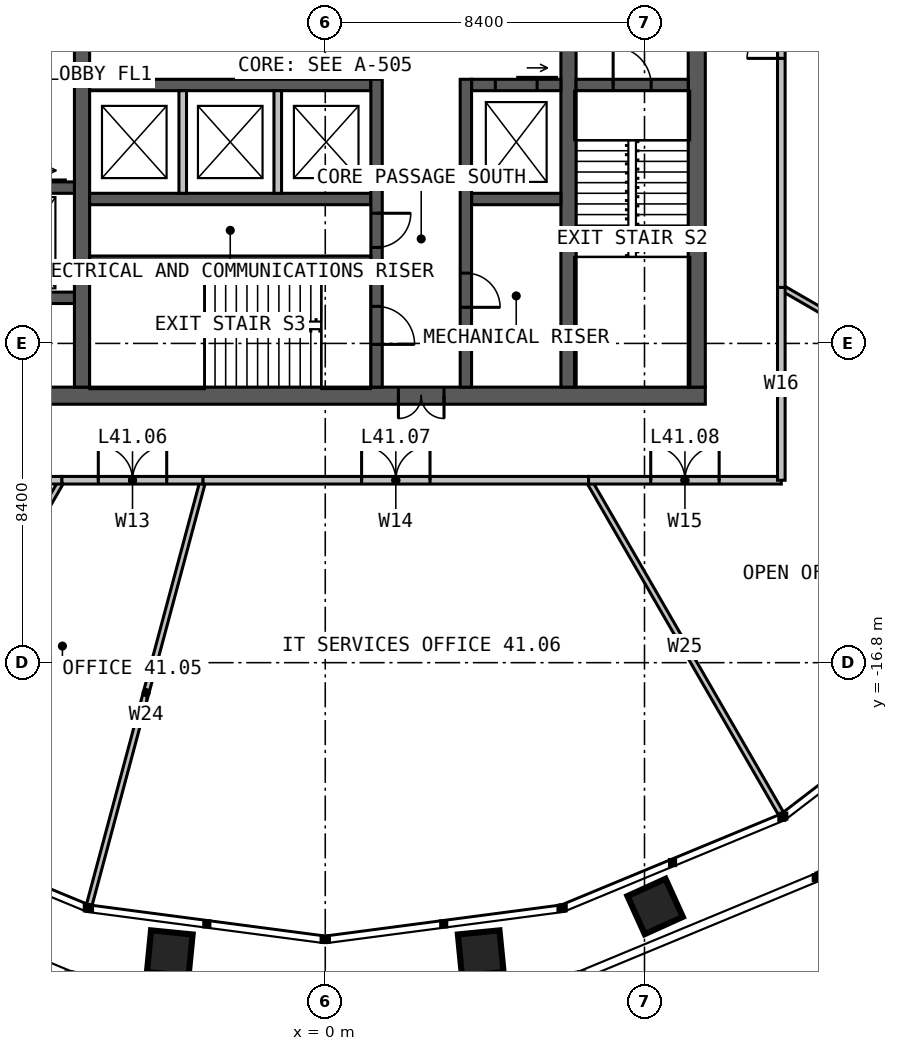
"""IFC4 building model, lengths in metres.
Left out: names, types, materials, properties, quantities, classifications, styles, units other than length and angle.
Written with IfcOpenShell. Run it as: python <this file> out.ifc"""

import sys

from ifc_helpers import new_model, si_unit, direction, frame, frame_2d, origin, place, context, subcontext, project, spatial, rectangle, extrude, element, fill, save


model = new_model("IFC4")
c1 = context("Model", 3, precision=1e-05, world=origin(), true_north=direction((0.0, 1.0)))
c2 = subcontext(c1, "Body", "Model", "MODEL_VIEW")
j1 = project(units=[si_unit("LENGTHUNIT", "METRE"), si_unit("PLANEANGLEUNIT", "RADIAN")], contexts=[c1])
p1 = place(None, origin())
s1 = spatial("IfcSite", under=j1, at=p1, CompositionType="ELEMENT")
p2 = place(p1, origin())
s2 = spatial("IfcBuilding", under=s1, at=p2, CompositionType="ELEMENT")
p3 = place(p2, frame((0.0, 0.0, 171.0)))
s3 = spatial("IfcBuildingStorey", under=s2, at=p3, CompositionType="ELEMENT", Elevation=171.0)
p4 = place(p3, frame((10.0, -9.775, 0.0), z_axis=(0.0, 0.0, 1.0), x_axis=(-1.0, 0.0, 0.0)))
e1 = element("IfcWall", 1, at=p4, inside=s3, PredefinedType="SOLIDWALL", context=c2, shape_type="SweptSolid", body=[
    extrude(rectangle(XDim=20.0, YDim=0.45, at=frame_2d((10.0, 0.0))), origin(), (0.0, 0.0, 1.0), 4.0),
])
p5 = place(p4, frame((6.875, 0.0, 0.0)))
e2 = element("IfcOpeningElement", 2, at=p5, cuts=e1, PredefinedType="OPENING", context=c2, shape_type="SweptSolid", body=[
    extrude(rectangle(XDim=1.2, YDim=2.2, at=frame_2d((0.6, 1.1))), frame((0.0, 0.235, 0.0), z_axis=(0.0, -1.0, 0.0), x_axis=(1.0, 0.0, 0.0)), (0.0, 0.0, 1.0), 0.47),
])
p6 = place(p3, frame((9.775, -9.55, 0.0), z_axis=(0.0, 0.0, 1.0), x_axis=(0.0, 1.0, 0.0)))
e3 = element("IfcWall", 3, at=p6, inside=s3, PredefinedType="SOLIDWALL", context=c2, shape_type="SweptSolid", body=[
    extrude(rectangle(XDim=19.1, YDim=0.45, at=frame_2d((9.55, 0.0))), origin(), (0.0, 0.0, 1.0), 4.0),
])
p7 = place(p3, frame((-6.4, -9.55, 0.0), z_axis=(0.0, 0.0, 1.0), x_axis=(0.0, 1.0, 0.0)))
e4 = element("IfcWall", 4, at=p7, inside=s3, PredefinedType="SOLIDWALL", context=c2, shape_type="SweptSolid", body=[
    extrude(rectangle(XDim=19.1, YDim=0.4, at=frame_2d((9.55, 0.0))), origin(), (0.0, 0.0, 1.0), 4.0),
])
p8 = place(p7, frame((9.05, 0.0, 0.0)))
e5 = element("IfcOpeningElement", 5, at=p8, cuts=e4, PredefinedType="OPENING", context=c2, shape_type="SweptSolid", body=[
    extrude(rectangle(XDim=1.0, YDim=2.2, at=frame_2d((0.5, 1.1))), frame((0.0, 0.21, 0.0), z_axis=(0.0, -1.0, 0.0), x_axis=(1.0, 0.0, 0.0)), (0.0, 0.0, 1.0), 0.42),
])
p9 = place(p3, frame((6.4, 9.55, 0.0), z_axis=(0.0, 0.0, 1.0), x_axis=(0.0, -1.0, 0.0)))
e6 = element("IfcWall", 6, at=p9, inside=s3, PredefinedType="SOLIDWALL", context=c2, shape_type="SweptSolid", body=[
    extrude(rectangle(XDim=19.1, YDim=0.4, at=frame_2d((9.55, 0.0))), origin(), (0.0, 0.0, 1.0), 4.0),
])
p10 = place(p9, frame((9.05, 0.0, 0.0)))
e7 = element("IfcOpeningElement", 7, at=p10, cuts=e6, PredefinedType="OPENING", context=c2, shape_type="SweptSolid", body=[
    extrude(rectangle(XDim=1.0, YDim=2.2, at=frame_2d((0.5, 1.1))), frame((0.0, 0.21, 0.0), z_axis=(0.0, -1.0, 0.0), x_axis=(1.0, 0.0, 0.0)), (0.0, 0.0, 1.0), 0.42),
])
p11 = place(p3, frame((-6.2, -1.6, 0.0), z_axis=(0.0, 0.0, 1.0), x_axis=(1.0, 0.0, 0.0)))
e8 = element("IfcWall", 8, at=p11, inside=s3, PredefinedType="SOLIDWALL", context=c2, shape_type="SweptSolid", body=[
    extrude(rectangle(XDim=7.4, YDim=0.3, at=frame_2d((3.7, 0.0))), origin(), (0.0, 0.0, 1.0), 4.0),
])
p12 = place(p3, frame((3.85, -1.6, 0.0), z_axis=(0.0, 0.0, 1.0), x_axis=(1.0, 0.0, 0.0)))
e9 = element("IfcWall", 9, at=p12, inside=s3, PredefinedType="SOLIDWALL", context=c2, shape_type="SweptSolid", body=[
    extrude(rectangle(XDim=2.35, YDim=0.3, at=frame_2d((1.175, 0.0))), origin(), (0.0, 0.0, 1.0), 4.0),
])
p13 = place(p12, frame((0.625, 0.0, 0.0)))
e10 = element("IfcOpeningElement", 10, at=p13, cuts=e9, PredefinedType="OPENING", context=c2, shape_type="SweptSolid", body=[
    extrude(rectangle(XDim=1.1, YDim=2.2, at=frame_2d((0.55, 1.1))), frame((0.0, 0.16, 0.0), z_axis=(0.0, -1.0, 0.0), x_axis=(1.0, 0.0, 0.0)), (0.0, 0.0, 1.0), 0.32),
])
p14 = place(p3, frame((-6.2, -4.6, 0.0), z_axis=(0.0, 0.0, 1.0), x_axis=(1.0, 0.0, 0.0)))
e11 = element("IfcWall", 11, at=p14, inside=s3, PredefinedType="SOLIDWALL", context=c2, shape_type="SweptSolid", body=[
    extrude(rectangle(XDim=7.4, YDim=0.3, at=frame_2d((3.7, 0.0))), origin(), (0.0, 0.0, 1.0), 4.0),
])
p15 = place(p3, frame((3.85, -4.6, 0.0), z_axis=(0.0, 0.0, 1.0), x_axis=(1.0, 0.0, 0.0)))
e12 = element("IfcWall", 12, at=p15, inside=s3, PredefinedType="SOLIDWALL", context=c2, shape_type="SweptSolid", body=[
    extrude(rectangle(XDim=2.35, YDim=0.3, at=frame_2d((1.175, 0.0))), origin(), (0.0, 0.0, 1.0), 4.0),
])
p16 = place(p3, frame((1.35, -1.45, 0.0), z_axis=(0.0, 0.0, 1.0), x_axis=(0.0, -1.0, 0.0)))
e13 = element("IfcWall", 13, at=p16, inside=s3, PredefinedType="SOLIDWALL", context=c2, shape_type="SweptSolid", body=[
    extrude(rectangle(XDim=8.1, YDim=0.3, at=frame_2d((4.05, 0.0))), origin(), (0.0, 0.0, 1.0), 4.0),
])
p17 = place(p16, frame((5.975, 0.0, 0.0)))
e14 = element("IfcOpeningElement", 14, at=p17, cuts=e13, PredefinedType="OPENING", context=c2, shape_type="SweptSolid", body=[
    extrude(rectangle(XDim=1.0, YDim=2.2, at=frame_2d((0.5, 1.1))), frame((0.0, 0.16, 0.0), z_axis=(0.0, -1.0, 0.0), x_axis=(1.0, 0.0, 0.0)), (0.0, 0.0, 1.0), 0.32),
])
p18 = place(p16, frame((3.525, 0.0, 0.0)))
e15 = element("IfcOpeningElement", 15, at=p18, cuts=e13, PredefinedType="OPENING", context=c2, shape_type="SweptSolid", body=[
    extrude(rectangle(XDim=0.9, YDim=2.2, at=frame_2d((0.45, 1.1))), frame((0.0, 0.16, 0.0), z_axis=(0.0, -1.0, 0.0), x_axis=(1.0, 0.0, 0.0)), (0.0, 0.0, 1.0), 0.32),
])
p19 = place(p3, frame((3.7, -1.45, 0.0), z_axis=(0.0, 0.0, 1.0), x_axis=(0.0, -1.0, 0.0)))
e16 = element("IfcWall", 16, at=p19, inside=s3, PredefinedType="SOLIDWALL", context=c2, shape_type="SweptSolid", body=[
    extrude(rectangle(XDim=8.1, YDim=0.3, at=frame_2d((4.05, 0.0))), origin(), (0.0, 0.0, 1.0), 4.0),
])
p20 = place(p19, frame((5.1, 0.0, 0.0)))
e17 = element("IfcOpeningElement", 17, at=p20, cuts=e16, PredefinedType="OPENING", context=c2, shape_type="SweptSolid", body=[
    extrude(rectangle(XDim=0.9, YDim=2.2, at=frame_2d((0.45, 1.1))), frame((0.0, 0.16, 0.0), z_axis=(0.0, -1.0, 0.0), x_axis=(1.0, 0.0, 0.0)), (0.0, 0.0, 1.0), 0.32),
])
p21 = place(p3, frame((-6.2, -6.2, 0.0), z_axis=(0.0, 0.0, 1.0), x_axis=(1.0, 0.0, 0.0)))
e18 = element("IfcWall", 18, at=p21, inside=s3, PredefinedType="SOLIDWALL", context=c2, shape_type="SweptSolid", body=[
    extrude(rectangle(XDim=7.4, YDim=0.2, at=frame_2d((3.7, 0.0))), origin(), (0.0, 0.0, 1.0), 4.0),
])
p22 = place(p3, frame((6.6, -1.6, 0.0), z_axis=(0.0, 0.0, 1.0), x_axis=(1.0, 0.0, 0.0)))
e19 = element("IfcWall", 19, at=p22, inside=s3, PredefinedType="SOLIDWALL", context=c2, shape_type="SweptSolid", body=[
    extrude(rectangle(XDim=2.95, YDim=0.3, at=frame_2d((1.475, 0.0))), origin(), (0.0, 0.0, 1.0), 4.0),
])
p23 = place(p22, frame((0.975, 0.0, 0.0)))
e20 = element("IfcOpeningElement", 20, at=p23, cuts=e19, PredefinedType="OPENING", context=c2, shape_type="SweptSolid", body=[
    extrude(rectangle(XDim=1.0, YDim=2.2, at=frame_2d((0.5, 1.1))), frame((0.0, 0.16, 0.0), z_axis=(0.0, -1.0, 0.0), x_axis=(1.0, 0.0, 0.0)), (0.0, 0.0, 1.0), 0.32),
])
p24 = place(p3, frame((-9.55, -4.3, 0.0), z_axis=(0.0, 0.0, 1.0), x_axis=(1.0, 0.0, 0.0)))
e21 = element("IfcWall", 21, at=p24, inside=s3, PredefinedType="SOLIDWALL", context=c2, shape_type="SweptSolid", body=[
    extrude(rectangle(XDim=2.95, YDim=0.3, at=frame_2d((1.475, 0.0))), origin(), (0.0, 0.0, 1.0), 4.0),
])
p25 = place(p24, frame((1.1, 0.0, 0.0)))
e22 = element("IfcOpeningElement", 22, at=p25, cuts=e21, PredefinedType="OPENING", context=c2, shape_type="SweptSolid", body=[
    extrude(rectangle(XDim=1.1, YDim=2.2, at=frame_2d((0.55, 1.1))), frame((0.0, 0.16, 0.0), z_axis=(0.0, -1.0, 0.0), x_axis=(1.0, 0.0, 0.0)), (0.0, 0.0, 1.0), 0.32),
])
p26 = place(p3, frame((-9.55, -7.2, 0.0), z_axis=(0.0, 0.0, 1.0), x_axis=(1.0, 0.0, 0.0)))
e23 = element("IfcWall", 23, at=p26, inside=s3, PredefinedType="SOLIDWALL", context=c2, shape_type="SweptSolid", body=[
    extrude(rectangle(XDim=2.95, YDim=0.3, at=frame_2d((1.475, 0.0))), origin(), (0.0, 0.0, 1.0), 4.0),
])
for number, where, z_axis, x_axis in (
    (24, (-3.75, -1.75, 0.0), (0.0, 0.0, 1.0), (0.0, -1.0, 0.0)),
    (25, (-1.25, -1.75, 0.0), (0.0, 0.0, 1.0), (0.0, -1.0, 0.0)),
):
    element("IfcWall", number, at=place(p3, frame(where, z_axis=z_axis, x_axis=x_axis)), inside=s3, PredefinedType="SOLIDWALL", context=c2, shape_type="SweptSolid", body=[
        extrude(rectangle(XDim=2.7, YDim=0.2, at=frame_2d((1.35, 0.0))), origin(), (0.0, 0.0, 1.0), 3.75),
    ])
for number, where, z_axis, x_axis in (
    (26, (12.0, -6.928, 0.0), (0.0, 0.0, 1.0), (0.866, -0.5, 0.0)),
    (27, (-6.928, -12.0, 0.0), (0.0, 0.0, 1.0), (-0.5, -0.866, 0.0)),
):
    element("IfcWall", number, at=place(p3, frame(where, z_axis=z_axis, x_axis=x_axis)), inside=s3, PredefinedType="PARTITIONING", context=c2, shape_type="SweptSolid", body=[
        extrude(rectangle(XDim=10.136, YDim=0.15, at=frame_2d((5.068, 0.0))), origin(), (0.0, 0.0, 1.0), 2.79),
    ])
p27 = place(p3, frame((-3.215, -12.0, 0.0), z_axis=(0.0, 0.0, 1.0), x_axis=(-0.258827502911, -0.965923559986, 0.0)))
e28 = element("IfcWall", 28, at=p27, inside=s3, PredefinedType="PARTITIONING", context=c2, shape_type="SweptSolid", body=[
    extrude(rectangle(XDim=11.569, YDim=0.15, at=frame_2d((5.785, 0.0))), origin(), (0.0, 0.0, 1.0), 2.79),
])
p28 = place(p3, frame((6.928, -12.0, 0.0), z_axis=(0.0, 0.0, 1.0), x_axis=(0.49999906822, -0.866025941747, 0.0)))
e29 = element("IfcWall", 29, at=p28, inside=s3, PredefinedType="PARTITIONING", context=c2, shape_type="SweptSolid", body=[
    extrude(rectangle(XDim=10.136, YDim=0.15, at=frame_2d((5.068, 0.0))), origin(), (0.0, 0.0, 1.0), 2.79),
])
p29 = place(p3, frame((12.0, -6.928, 0.0), z_axis=(0.0, 0.0, 1.0), x_axis=(0.0, 1.0, 0.0)))
e30 = element("IfcWall", 30, at=p29, inside=s3, PredefinedType="PARTITIONING", context=c2, shape_type="SweptSolid", body=[
    extrude(rectangle(XDim=13.856, YDim=0.2, at=frame_2d((6.928, 0.0))), origin(), (0.0, 0.0, 1.0), 3.8),
])
p30 = place(p29, frame((6.028, 0.0, 0.0)))
e31 = element("IfcOpeningElement", 31, at=p30, cuts=e30, PredefinedType="OPENING", context=c2, shape_type="SweptSolid", body=[
    extrude(rectangle(XDim=1.8, YDim=2.2, at=frame_2d((0.9, 1.1))), frame((0.0, 0.11, 0.0), z_axis=(0.0, -1.0, 0.0), x_axis=(1.0, 0.0, 0.0)), (0.0, 0.0, 1.0), 0.22),
])
p31 = place(p3, frame((-12.0, -12.0, 0.0), z_axis=(0.0, 0.0, 1.0), x_axis=(1.0, 0.0, 0.0)))
e32 = element("IfcWall", 32, at=p31, inside=s3, PredefinedType="PARTITIONING", context=c2, shape_type="SweptSolid", body=[
    extrude(rectangle(XDim=5.072, YDim=0.2, at=frame_2d((2.536, 0.0))), origin(), (0.0, 0.0, 1.0), 3.8),
])
p32 = place(p31, frame((2.036, 0.0, 0.0)))
e33 = element("IfcOpeningElement", 33, at=p32, cuts=e32, PredefinedType="OPENING", context=c2, shape_type="SweptSolid", body=[
    extrude(rectangle(XDim=1.0, YDim=2.2, at=frame_2d((0.5, 1.1))), frame((0.0, 0.11, 0.0), z_axis=(0.0, -1.0, 0.0), x_axis=(1.0, 0.0, 0.0)), (0.0, 0.0, 1.0), 0.22),
])
p33 = place(p3, frame((-6.928, -12.0, 0.0), z_axis=(0.0, 0.0, 1.0), x_axis=(1.0, 0.0, 0.0)))
e34 = element("IfcWall", 34, at=p33, inside=s3, PredefinedType="PARTITIONING", context=c2, shape_type="SweptSolid", body=[
    extrude(rectangle(XDim=3.713, YDim=0.2, at=frame_2d((1.856, 0.0))), origin(), (0.0, 0.0, 1.0), 3.8),
])
p34 = place(p33, frame((0.956, 0.0, 0.0)))
e35 = element("IfcOpeningElement", 35, at=p34, cuts=e34, PredefinedType="OPENING", context=c2, shape_type="SweptSolid", body=[
    extrude(rectangle(XDim=1.8, YDim=2.2, at=frame_2d((0.9, 1.1))), frame((0.0, 0.11, 0.0), z_axis=(0.0, -1.0, 0.0), x_axis=(1.0, 0.0, 0.0)), (0.0, 0.0, 1.0), 0.22),
])
p35 = place(p3, frame((-3.215, -12.0, 0.0), z_axis=(0.0, 0.0, 1.0), x_axis=(1.0, 0.0, 0.0)))
e36 = element("IfcWall", 36, at=p35, inside=s3, PredefinedType="PARTITIONING", context=c2, shape_type="SweptSolid", body=[
    extrude(rectangle(XDim=10.144, YDim=0.2, at=frame_2d((5.072, 0.0))), origin(), (0.0, 0.0, 1.0), 3.8),
])
p36 = place(p35, frame((4.172, 0.0, 0.0)))
e37 = element("IfcOpeningElement", 37, at=p36, cuts=e36, PredefinedType="OPENING", context=c2, shape_type="SweptSolid", body=[
    extrude(rectangle(XDim=1.8, YDim=2.2, at=frame_2d((0.9, 1.1))), frame((0.0, 0.11, 0.0), z_axis=(0.0, -1.0, 0.0), x_axis=(1.0, 0.0, 0.0)), (0.0, 0.0, 1.0), 0.22),
])
p37 = place(p3, frame((6.928, -12.0, 0.0), z_axis=(0.0, 0.0, 1.0), x_axis=(1.0, 0.0, 0.0)))
e38 = element("IfcWall", 38, at=p37, inside=s3, PredefinedType="PARTITIONING", context=c2, shape_type="SweptSolid", body=[
    extrude(rectangle(XDim=5.072, YDim=0.2, at=frame_2d((2.536, 0.0))), origin(), (0.0, 0.0, 1.0), 3.8),
])
p38 = place(p37, frame((1.636, 0.0, 0.0)))
e39 = element("IfcOpeningElement", 39, at=p38, cuts=e38, PredefinedType="OPENING", context=c2, shape_type="SweptSolid", body=[
    extrude(rectangle(XDim=1.8, YDim=2.2, at=frame_2d((0.9, 1.1))), frame((0.0, 0.11, 0.0), z_axis=(0.0, -1.0, 0.0), x_axis=(1.0, 0.0, 0.0)), (0.0, 0.0, 1.0), 0.22),
])
p39 = place(p3, frame((12.0, -12.0, 0.0), z_axis=(0.0, 0.0, 1.0), x_axis=(0.0, 1.0, 0.0)))
e40 = element("IfcWall", 40, at=p39, inside=s3, PredefinedType="PARTITIONING", context=c2, shape_type="SweptSolid", body=[
    extrude(rectangle(XDim=5.072, YDim=0.2, at=frame_2d((2.536, 0.0))), origin(), (0.0, 0.0, 1.0), 3.8),
])
p40 = place(p5, origin())
e41 = element("IfcDoor", 41, at=p40, inside=s3, OperationType="DOUBLE_DOOR_SINGLE_SWING", PredefinedType="DOOR", context=c2, shape_type="SweptSolid", body=[
    extrude(rectangle(XDim=1.2, YDim=2.2, at=frame_2d((0.6, 1.1))), frame((0.0, 0.025, 0.0), z_axis=(0.0, -1.0, 0.0), x_axis=(1.0, 0.0, 0.0)), (0.0, 0.0, 1.0), 0.05),
])
fill(e2, e41)
p41 = place(p23, origin())
e42 = element("IfcDoor", 42, at=p41, inside=s3, OperationType="SINGLE_SWING_LEFT", PredefinedType="DOOR", context=c2, shape_type="SweptSolid", body=[
    extrude(rectangle(XDim=1.0, YDim=2.2, at=frame_2d((0.5, 1.1))), frame((0.0, 0.025, 0.0), z_axis=(0.0, -1.0, 0.0), x_axis=(1.0, 0.0, 0.0)), (0.0, 0.0, 1.0), 0.05),
])
fill(e20, e42)
p42 = place(p17, origin())
e43 = element("IfcDoor", 43, at=p42, inside=s3, OperationType="SINGLE_SWING_RIGHT", PredefinedType="DOOR", context=c2, shape_type="SweptSolid", body=[
    extrude(rectangle(XDim=1.0, YDim=2.2, at=frame_2d((0.5, 1.1))), frame((0.0, 0.025, 0.0), z_axis=(0.0, -1.0, 0.0), x_axis=(1.0, 0.0, 0.0)), (0.0, 0.0, 1.0), 0.05),
])
fill(e14, e43)
p43 = place(p18, origin())
e44 = element("IfcDoor", 44, at=p43, inside=s3, OperationType="SINGLE_SWING_LEFT", PredefinedType="DOOR", context=c2, shape_type="SweptSolid", body=[
    extrude(rectangle(XDim=0.9, YDim=2.2, at=frame_2d((0.45, 1.1))), frame((0.0, 0.025, 0.0), z_axis=(0.0, -1.0, 0.0), x_axis=(1.0, 0.0, 0.0)), (0.0, 0.0, 1.0), 0.05),
])
fill(e15, e44)
p44 = place(p20, origin())
e45 = element("IfcDoor", 45, at=p44, inside=s3, OperationType="SINGLE_SWING_RIGHT", PredefinedType="DOOR", context=c2, shape_type="SweptSolid", body=[
    extrude(rectangle(XDim=0.9, YDim=2.2, at=frame_2d((0.45, 1.1))), frame((0.0, 0.025, 0.0), z_axis=(0.0, -1.0, 0.0), x_axis=(1.0, 0.0, 0.0)), (0.0, 0.0, 1.0), 0.05),
])
fill(e17, e45)
p45 = place(p13, origin())
e46 = element("IfcDoor", 46, at=p45, inside=s3, OperationType="SLIDING_TO_LEFT", PredefinedType="DOOR", context=c2, shape_type="SweptSolid", body=[
    extrude(rectangle(XDim=1.1, YDim=2.2, at=frame_2d((0.55, 1.1))), frame((0.0, 0.025, 0.0), z_axis=(0.0, -1.0, 0.0), x_axis=(1.0, 0.0, 0.0)), (0.0, 0.0, 1.0), 0.05),
])
fill(e10, e46)
p46 = place(p30, origin())
e47 = element("IfcDoor", 47, at=p46, inside=s3, OperationType="DOUBLE_DOOR_SINGLE_SWING", PredefinedType="DOOR", context=c2, shape_type="SweptSolid", body=[
    extrude(rectangle(XDim=1.8, YDim=2.2, at=frame_2d((0.9, 1.1))), frame((0.0, 0.025, 0.0), z_axis=(0.0, -1.0, 0.0), x_axis=(1.0, 0.0, 0.0)), (0.0, 0.0, 1.0), 0.05),
])
fill(e31, e47)
p47 = place(p34, origin())
e48 = element("IfcDoor", 48, at=p47, inside=s3, OperationType="DOUBLE_DOOR_SINGLE_SWING", PredefinedType="DOOR", context=c2, shape_type="SweptSolid", body=[
    extrude(rectangle(XDim=1.8, YDim=2.2, at=frame_2d((0.9, 1.1))), frame((0.0, 0.025, 0.0), z_axis=(0.0, -1.0, 0.0), x_axis=(1.0, 0.0, 0.0)), (0.0, 0.0, 1.0), 0.05),
])
fill(e35, e48)
p48 = place(p36, origin())
e49 = element("IfcDoor", 49, at=p48, inside=s3, OperationType="DOUBLE_DOOR_SINGLE_SWING", PredefinedType="DOOR", context=c2, shape_type="SweptSolid", body=[
    extrude(rectangle(XDim=1.8, YDim=2.2, at=frame_2d((0.9, 1.1))), frame((0.0, 0.025, 0.0), z_axis=(0.0, -1.0, 0.0), x_axis=(1.0, 0.0, 0.0)), (0.0, 0.0, 1.0), 0.05),
])
fill(e37, e49)
p49 = place(p38, origin())
e50 = element("IfcDoor", 50, at=p49, inside=s3, OperationType="DOUBLE_DOOR_SINGLE_SWING", PredefinedType="DOOR", context=c2, shape_type="SweptSolid", body=[
    extrude(rectangle(XDim=1.8, YDim=2.2, at=frame_2d((0.9, 1.1))), frame((0.0, 0.025, 0.0), z_axis=(0.0, -1.0, 0.0), x_axis=(1.0, 0.0, 0.0)), (0.0, 0.0, 1.0), 0.05),
])
fill(e39, e50)
save(model, sys.argv[1])
